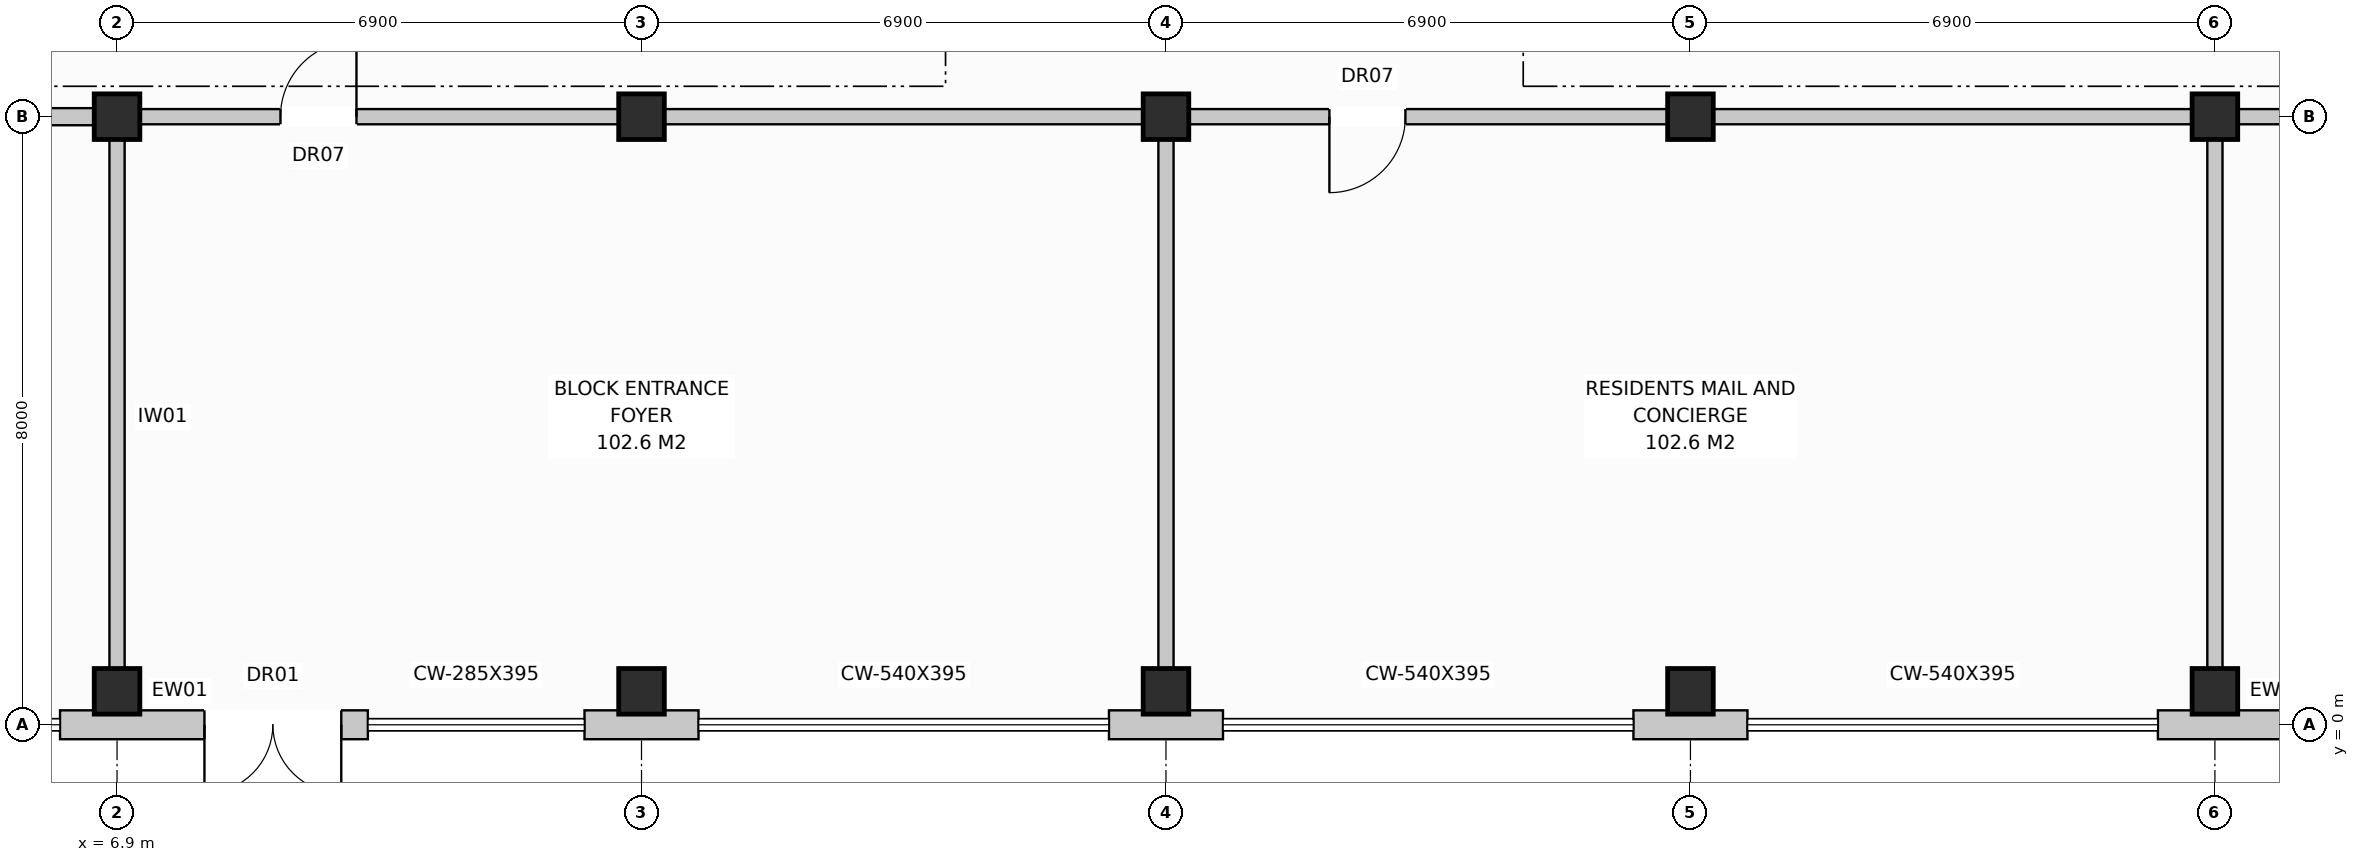
"""IFC4 building model, lengths in metres.
Left out: names, types, materials, properties, quantities, classifications, styles, units other than length and angle.
Written with IfcOpenShell. Run it as: python <this file> out.ifc"""

import sys

from ifc_helpers import new_model, si_unit, direction, frame, frame_2d, origin, origin_with_axes, origin_2d, place, context, subcontext, project, spatial, rectangle, extrude, element, fill, save


model = new_model("IFC4")
c1 = context("Model", 3, precision=1e-05, world=origin(), true_north=direction((0.0, 1.0)))
c2 = subcontext(c1, "Body", "Model", "MODEL_VIEW")
j1 = project(units=[si_unit("LENGTHUNIT", "METRE"), si_unit("PLANEANGLEUNIT", "RADIAN")], contexts=[c1])
p1 = place(None, origin())
s1 = spatial("IfcSite", under=j1, at=p1, CompositionType="ELEMENT")
p2 = place(p1, origin())
s2 = spatial("IfcBuilding", under=s1, at=p2, CompositionType="ELEMENT")
p3 = place(p2, origin())
s3 = spatial("IfcBuildingStorey", under=s2, at=p3, CompositionType="ELEMENT", Elevation=0.0)
for number, where, z_axis, x_axis in (
    (1, (6.9, 0.44, 0.0), (0.0, 0.0, 1.0), (1.0, 0.0, 0.0)),
    (2, (6.9, 8.0, 0.0), (0.0, 0.0, 1.0), (1.0, 0.0, 0.0)),
    (3, (13.8, 0.44, 0.0), (0.0, 0.0, 1.0), (1.0, 0.0, 0.0)),
    (4, (13.8, 8.0, 0.0), (0.0, 0.0, 1.0), (1.0, 0.0, 0.0)),
    (5, (20.7, 0.44, 0.0), (0.0, 0.0, 1.0), (1.0, 0.0, 0.0)),
    (6, (20.7, 8.0, 0.0), (0.0, 0.0, 1.0), (1.0, 0.0, 0.0)),
    (7, (27.6, 0.44, 0.0), (0.0, 0.0, 1.0), (1.0, 0.0, 0.0)),
    (8, (27.6, 8.0, 0.0), (0.0, 0.0, 1.0), (1.0, 0.0, 0.0)),
    (9, (34.5, 0.44, 0.0), (0.0, 0.0, 1.0), (1.0, 0.0, 0.0)),
    (10, (34.5, 8.0, 0.0), (0.0, 0.0, 1.0), (1.0, 0.0, 0.0)),
):
    element("IfcColumn", number, at=place(p3, frame(where, z_axis=z_axis, x_axis=x_axis)), inside=s3, PredefinedType="COLUMN", context=c2, shape_type="SweptSolid", body=[
        extrude(rectangle(XDim=0.6, YDim=0.6, at=origin_2d()), origin(), (0.0, 0.0, 1.0), 4.4),
    ])
p4 = place(p3, frame((6.15, 0.0, 0.0), z_axis=(0.0, 0.0, 1.0), x_axis=(1.0, 0.0, 0.0)))
e11 = element("IfcWall", 11, at=p4, inside=s3, PredefinedType="STANDARD", context=c2, shape_type="SweptSolid", body=[
    extrude(rectangle(XDim=4.05, YDim=0.38, at=frame_2d((2.025, 0.0))), origin(), (0.0, 0.0, 1.0), 4.12),
])
p5 = place(p4, frame((1.9, 0.0, 0.0)))
e12 = element("IfcOpeningElement", 12, at=p5, cuts=e11, PredefinedType="OPENING", context=c2, shape_type="SweptSolid", body=[
    extrude(rectangle(XDim=1.8, YDim=2.4, at=frame_2d((0.9, 1.2))), frame((0.0, 0.202, 0.0), z_axis=(0.0, -1.0, 0.0), x_axis=(1.0, 0.0, 0.0)), (0.0, 0.0, 1.0), 0.404),
])
for number, where, z_axis, x_axis in (
    (13, (13.05, 0.0, 0.0), (0.0, 0.0, 1.0), (1.0, 0.0, 0.0)),
    (14, (19.95, 0.0, 0.0), (0.0, 0.0, 1.0), (1.0, 0.0, 0.0)),
    (15, (26.85, 0.0, 0.0), (0.0, 0.0, 1.0), (1.0, 0.0, 0.0)),
):
    element("IfcWall", number, at=place(p3, frame(where, z_axis=z_axis, x_axis=x_axis)), inside=s3, PredefinedType="STANDARD", context=c2, shape_type="SweptSolid", body=[
        extrude(rectangle(XDim=1.5, YDim=0.38, at=frame_2d((0.75, 0.0))), origin(), (0.0, 0.0, 1.0), 4.12),
    ])
p6 = place(p3, frame((33.75, 0.0, 0.0), z_axis=(0.0, 0.0, 1.0), x_axis=(1.0, 0.0, 0.0)))
e16 = element("IfcWall", 16, at=p6, inside=s3, PredefinedType="STANDARD", context=c2, shape_type="SweptSolid", body=[
    extrude(rectangle(XDim=4.05, YDim=0.38, at=frame_2d((2.025, 0.0))), origin(), (0.0, 0.0, 1.0), 4.12),
])
p7 = place(p6, frame((1.9, 0.0, 0.0)))
e17 = element("IfcOpeningElement", 17, at=p7, cuts=e16, PredefinedType="OPENING", context=c2, shape_type="SweptSolid", body=[
    extrude(rectangle(XDim=1.8, YDim=2.4, at=frame_2d((0.9, 1.2))), frame((0.0, 0.202, 0.0), z_axis=(0.0, -1.0, 0.0), x_axis=(1.0, 0.0, 0.0)), (0.0, 0.0, 1.0), 0.404),
])
p8 = place(p3, frame((0.3, 8.0, 0.0), z_axis=(0.0, 0.0, 1.0), x_axis=(1.0, 0.0, 0.0)))
e18 = element("IfcWall", 18, at=p8, inside=s3, PredefinedType="PARTITIONING", context=c2, shape_type="SweptSolid", body=[
    extrude(rectangle(XDim=6.45, YDim=0.225, at=frame_2d((3.225, 0.0))), origin(), (0.0, 0.0, 1.0), 3.56),
])
p9 = place(p8, frame((2.0, 0.0, 0.0)))
e19 = element("IfcOpeningElement", 19, at=p9, cuts=e18, PredefinedType="OPENING", context=c2, shape_type="SweptSolid", body=[
    extrude(rectangle(XDim=1.0, YDim=2.15, at=frame_2d((0.5, 1.075))), frame((0.0, 0.125, 0.0), z_axis=(0.0, -1.0, 0.0), x_axis=(1.0, 0.0, 0.0)), (0.0, 0.0, 1.0), 0.249),
])
p10 = place(p3, frame((6.9, 0.25, 0.0), z_axis=(0.0, 0.0, 1.0), x_axis=(0.0, 1.0, 0.0)))
e20 = element("IfcWall", 20, at=p10, inside=s3, PredefinedType="PARTITIONING", context=c2, shape_type="SweptSolid", body=[
    extrude(rectangle(XDim=7.6, YDim=0.2, at=frame_2d((3.8, 0.0))), origin(), (0.0, 0.0, 1.0), 3.56),
])
p11 = place(p3, frame((7.05, 8.0, 0.0), z_axis=(0.0, 0.0, 1.0), x_axis=(1.0, 0.0, 0.0)))
e21 = element("IfcWall", 21, at=p11, inside=s3, PredefinedType="PARTITIONING", context=c2, shape_type="SweptSolid", body=[
    extrude(rectangle(XDim=13.5, YDim=0.2, at=frame_2d((6.75, 0.0))), origin(), (0.0, 0.0, 1.0), 3.56),
])
p12 = place(p11, frame((2.0, 0.0, 0.0)))
e22 = element("IfcOpeningElement", 22, at=p12, cuts=e21, PredefinedType="OPENING", context=c2, shape_type="SweptSolid", body=[
    extrude(rectangle(XDim=1.0, YDim=2.15, at=frame_2d((0.5, 1.075))), frame((0.0, 0.112, 0.0), z_axis=(0.0, -1.0, 0.0), x_axis=(1.0, 0.0, 0.0)), (0.0, 0.0, 1.0), 0.224),
])
p13 = place(p3, frame((20.7, 0.25, 0.0), z_axis=(0.0, 0.0, 1.0), x_axis=(0.0, 1.0, 0.0)))
e23 = element("IfcWall", 23, at=p13, inside=s3, PredefinedType="PARTITIONING", context=c2, shape_type="SweptSolid", body=[
    extrude(rectangle(XDim=7.6, YDim=0.2, at=frame_2d((3.8, 0.0))), origin(), (0.0, 0.0, 1.0), 4.12),
])
p14 = place(p3, frame((20.85, 8.0, 0.0), z_axis=(0.0, 0.0, 1.0), x_axis=(1.0, 0.0, 0.0)))
e24 = element("IfcWall", 24, at=p14, inside=s3, PredefinedType="PARTITIONING", context=c2, shape_type="SweptSolid", body=[
    extrude(rectangle(XDim=13.5, YDim=0.2, at=frame_2d((6.75, 0.0))), origin(), (0.0, 0.0, 1.0), 3.56),
])
p15 = place(p14, frame((2.0, 0.0, 0.0)))
e25 = element("IfcOpeningElement", 25, at=p15, cuts=e24, PredefinedType="OPENING", context=c2, shape_type="SweptSolid", body=[
    extrude(rectangle(XDim=1.0, YDim=2.15, at=frame_2d((0.5, 1.075))), frame((0.0, 0.112, 0.0), z_axis=(0.0, -1.0, 0.0), x_axis=(1.0, 0.0, 0.0)), (0.0, 0.0, 1.0), 0.224),
])
p16 = place(p3, frame((34.5, 0.25, 0.0), z_axis=(0.0, 0.0, 1.0), x_axis=(0.0, 1.0, 0.0)))
e26 = element("IfcWall", 26, at=p16, inside=s3, PredefinedType="PARTITIONING", context=c2, shape_type="SweptSolid", body=[
    extrude(rectangle(XDim=7.6, YDim=0.2, at=frame_2d((3.8, 0.0))), origin(), (0.0, 0.0, 1.0), 4.12),
])
p17 = place(p3, frame((34.65, 8.0, 0.0), z_axis=(0.0, 0.0, 1.0), x_axis=(1.0, 0.0, 0.0)))
e27 = element("IfcWall", 27, at=p17, inside=s3, PredefinedType="PARTITIONING", context=c2, shape_type="SweptSolid", body=[
    extrude(rectangle(XDim=13.5, YDim=0.2, at=frame_2d((6.75, 0.0))), origin(), (0.0, 0.0, 1.0), 3.56),
])
p18 = place(p17, frame((2.0, 0.0, 0.0)))
e28 = element("IfcOpeningElement", 28, at=p18, cuts=e27, PredefinedType="OPENING", context=c2, shape_type="SweptSolid", body=[
    extrude(rectangle(XDim=1.0, YDim=2.15, at=frame_2d((0.5, 1.075))), frame((0.0, 0.112, 0.0), z_axis=(0.0, -1.0, 0.0), x_axis=(1.0, 0.0, 0.0)), (0.0, 0.0, 1.0), 0.224),
])
p19 = place(p5, frame((1.8, 0.0, 0.0), z_axis=(0.0, 0.0, 1.0), x_axis=(-1.0, 0.0, 0.0)))
e29 = element("IfcDoor", 29, at=p19, inside=s3, OperationType="DOUBLE_DOOR_SINGLE_SWING", PredefinedType="DOOR", context=c2, shape_type="SweptSolid", body=[
    extrude(rectangle(XDim=1.8, YDim=2.4, at=frame_2d((0.9, 1.2))), frame((0.0, 0.025, 0.0), z_axis=(0.0, -1.0, 0.0), x_axis=(1.0, 0.0, 0.0)), (0.0, 0.0, 1.0), 0.05),
])
fill(e12, e29)
p20 = place(p12, origin_with_axes())
e30 = element("IfcDoor", 30, at=p20, inside=s3, OperationType="SINGLE_SWING_RIGHT", PredefinedType="DOOR", context=c2, shape_type="SweptSolid", body=[
    extrude(rectangle(XDim=1.0, YDim=2.15, at=frame_2d((0.5, 1.075))), frame((0.0, 0.025, 0.0), z_axis=(0.0, -1.0, 0.0), x_axis=(1.0, 0.0, 0.0)), (0.0, 0.0, 1.0), 0.05),
])
fill(e22, e30)
p21 = place(p15, frame((1.0, 0.0, 0.0), z_axis=(0.0, 0.0, 1.0), x_axis=(-1.0, 0.0, 0.0)))
e31 = element("IfcDoor", 31, at=p21, inside=s3, OperationType="SINGLE_SWING_LEFT", PredefinedType="DOOR", context=c2, shape_type="SweptSolid", body=[
    extrude(rectangle(XDim=1.0, YDim=2.15, at=frame_2d((0.5, 1.075))), frame((0.0, 0.025, 0.0), z_axis=(0.0, -1.0, 0.0), x_axis=(1.0, 0.0, 0.0)), (0.0, 0.0, 1.0), 0.05),
])
fill(e25, e31)
save(model, sys.argv[1])
